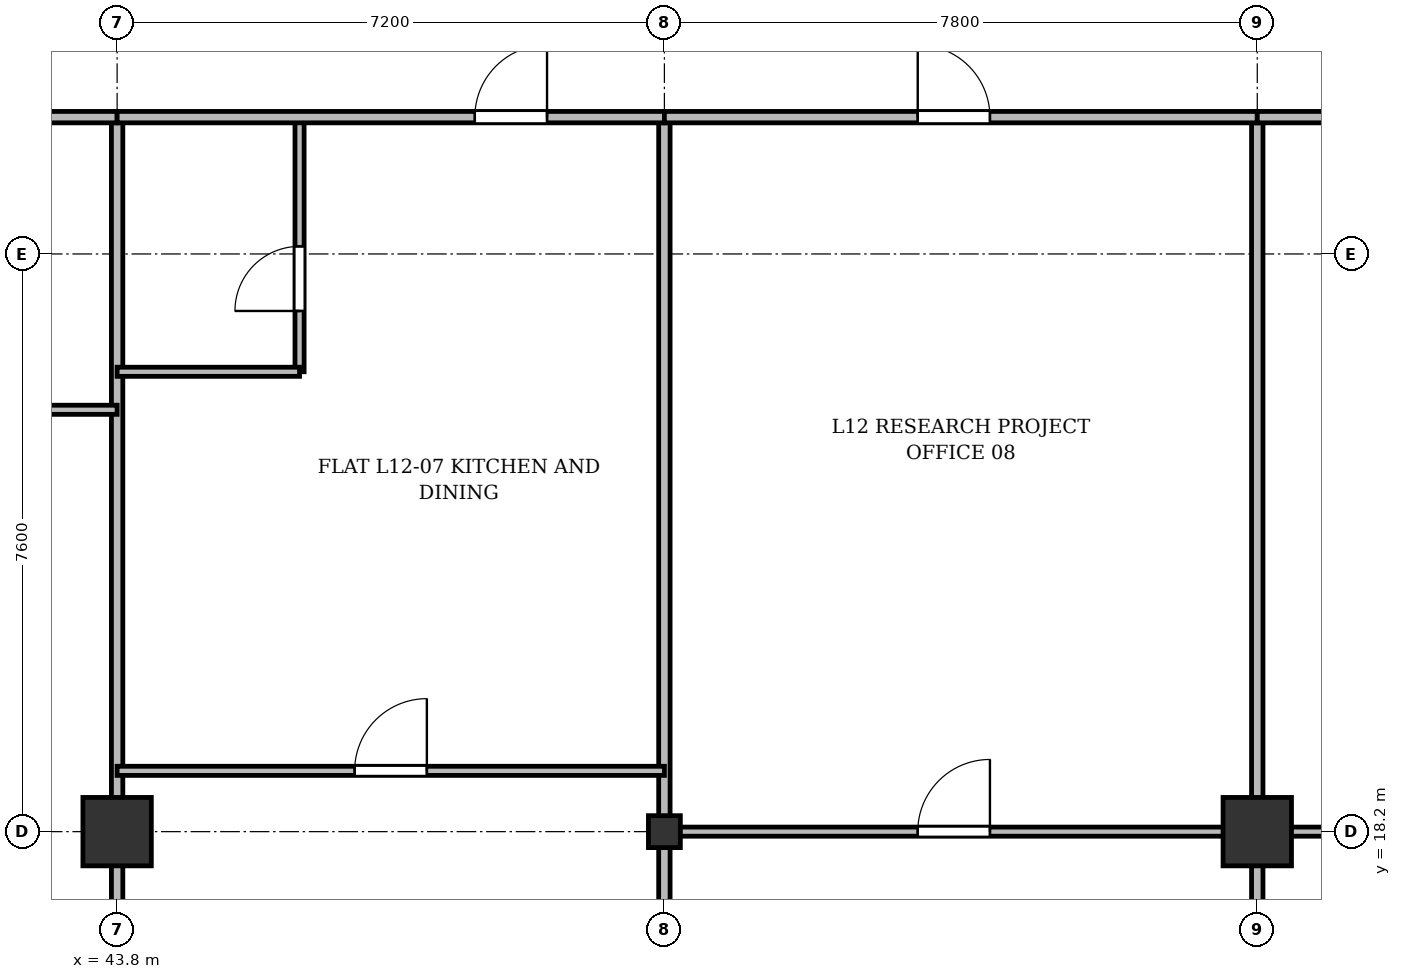
"""IFC4 building model, lengths in metres.
Left out: names, types, materials, properties, quantities, classifications, styles, units other than length and angle.
Written with IfcOpenShell. Run it as: python <this file> out.ifc"""

import sys

from ifc_helpers import new_model, si_unit, direction, frame, frame_2d, origin, origin_2d, place, context, subcontext, project, spatial, rectangle, i_section, extrude, source, transform, mapped, element, fill, save


model = new_model("IFC4")
c1 = context("Model", 3, precision=1e-05, world=origin(), true_north=direction((0.0, 1.0)))
c2 = subcontext(c1, "Body", "Model", "MODEL_VIEW")
j1 = project(units=[si_unit("LENGTHUNIT", "METRE"), si_unit("PLANEANGLEUNIT", "RADIAN")], contexts=[c1])
p1 = place(None, origin())
s1 = spatial("IfcSite", under=j1, at=p1, CompositionType="ELEMENT")
p2 = place(p1, origin())
s2 = spatial("IfcBuilding", under=s1, at=p2, CompositionType="ELEMENT")
p3 = place(p2, frame((0.0, 0.0, 48.7)))
s3 = spatial("IfcBuildingStorey", under=s2, at=p3, CompositionType="ELEMENT", Elevation=48.7)
m1 = source(origin(), c2, "Body", "SweptSolid", [
    extrude(rectangle(XDim=0.9, YDim=0.9, at=origin_2d()), origin(), (0.0, 0.0, 1.0), 3.6),
])
p4 = place(p3, frame((43.8, 18.2, 0.0), z_axis=(0.0, 0.0, 1.0), x_axis=(1.0, 0.0, 0.0)))
e1 = element("IfcColumn", 1, at=p4, inside=s3, PredefinedType="COLUMN", context=c2, shape_type="MappedRepresentation", body=[
    mapped(m1, transform((0.0, 0.0, 0.0), x_axis=(1.0, 0.0, 0.0), y_axis=(0.0, 1.0, 0.0), z_axis=(0.0, 0.0, 1.0), scale=1.0)),
])
m2 = source(origin(), c2, "Body", "SweptSolid", [
    extrude(i_section(OverallWidth=0.42, OverallDepth=0.42, WebThickness=0.026, FlangeThickness=0.04, at=origin_2d()), origin(), (0.0, 0.0, 1.0), 3.6),
])
p5 = place(p3, frame((51.0, 18.2, 0.0), z_axis=(0.0, 0.0, 1.0), x_axis=(1.0, 0.0, 0.0)))
e2 = element("IfcColumn", 2, at=p5, inside=s3, PredefinedType="COLUMN", context=c2, shape_type="MappedRepresentation", body=[
    mapped(m2, transform((0.0, 0.0, 0.0), x_axis=(1.0, 0.0, 0.0), y_axis=(0.0, 1.0, 0.0), z_axis=(0.0, 0.0, 1.0), scale=1.0)),
])
p6 = place(p3, frame((58.8, 18.2, 0.0), z_axis=(0.0, 0.0, 1.0), x_axis=(1.0, 0.0, 0.0)))
e3 = element("IfcColumn", 3, at=p6, inside=s3, PredefinedType="COLUMN", context=c2, shape_type="MappedRepresentation", body=[
    mapped(m1, transform((0.0, 0.0, 0.0), x_axis=(1.0, 0.0, 0.0), y_axis=(0.0, 1.0, 0.0), z_axis=(0.0, 0.0, 1.0), scale=1.0)),
])
for number, where, z_axis, x_axis in (
    (4, (43.8, 3.145, 0.0), (0.0, 0.0, 1.0), (0.0, 1.0, 0.0)),
    (5, (51.0, 3.145, 0.0), (0.0, 0.0, 1.0), (0.0, 1.0, 0.0)),
    (6, (58.8, 3.145, 0.0), (0.0, 0.0, 1.0), (0.0, 1.0, 0.0)),
):
    element("IfcWall", number, at=place(p3, frame(where, z_axis=z_axis, x_axis=x_axis)), inside=s3, PredefinedType="PARTITIONING", context=c2, shape_type="SweptSolid", body=[
        extrude(rectangle(XDim=24.455, YDim=0.15, at=frame_2d((12.228, 0.0))), origin(), (0.0, 0.0, 1.0), 2.752),
    ])
p7 = place(p3, frame((39.0, 27.6, 0.0), z_axis=(0.0, 0.0, 1.0), x_axis=(1.0, 0.0, 0.0)))
e7 = element("IfcWall", 7, at=p7, inside=s3, PredefinedType="PARTITIONING", context=c2, shape_type="SweptSolid", body=[
    extrude(rectangle(XDim=4.8, YDim=0.15, at=frame_2d((2.4, 0.0))), origin(), (0.0, 0.0, 1.0), 2.752),
])
p8 = place(p7, frame((1.834, 0.0, 0.0)))
e8 = element("IfcOpeningElement", 8, at=p8, cuts=e7, PredefinedType="OPENING", context=c2, shape_type="SweptSolid", body=[
    extrude(rectangle(XDim=0.95, YDim=2.15, at=frame_2d((0.475, 1.075))), frame((0.0, 0.085, 0.0), z_axis=(0.0, -1.0, 0.0), x_axis=(1.0, 0.0, 0.0)), (0.0, 0.0, 1.0), 0.17),
])
p9 = place(p3, frame((39.0, 23.75, 0.0), z_axis=(0.0, 0.0, 1.0), x_axis=(1.0, 0.0, 0.0)))
e9 = element("IfcWall", 9, at=p9, inside=s3, PredefinedType="PARTITIONING", context=c2, shape_type="SweptSolid", body=[
    extrude(rectangle(XDim=4.8, YDim=0.12, at=frame_2d((2.4, 0.0))), origin(), (0.0, 0.0, 1.0), 2.752),
])
p10 = place(p9, frame((1.834, 0.0, 0.0)))
e10 = element("IfcOpeningElement", 10, at=p10, cuts=e9, PredefinedType="OPENING", context=c2, shape_type="SweptSolid", body=[
    extrude(rectangle(XDim=0.95, YDim=2.15, at=frame_2d((0.475, 1.075))), frame((0.0, 0.07, 0.0), z_axis=(0.0, -1.0, 0.0), x_axis=(1.0, 0.0, 0.0)), (0.0, 0.0, 1.0), 0.14),
])
p11 = place(p3, frame((43.8, 19.0, 0.0), z_axis=(0.0, 0.0, 1.0), x_axis=(1.0, 0.0, 0.0)))
e11 = element("IfcWall", 11, at=p11, inside=s3, PredefinedType="PARTITIONING", context=c2, shape_type="SweptSolid", body=[
    extrude(rectangle(XDim=7.2, YDim=0.12, at=frame_2d((3.6, 0.0))), origin(), (0.0, 0.0, 1.0), 2.752),
])
p12 = place(p11, frame((3.125, 0.0, 0.0)))
e12 = element("IfcOpeningElement", 12, at=p12, cuts=e11, PredefinedType="OPENING", context=c2, shape_type="SweptSolid", body=[
    extrude(rectangle(XDim=0.95, YDim=2.15, at=frame_2d((0.475, 1.075))), frame((0.0, 0.07, 0.0), z_axis=(0.0, -1.0, 0.0), x_axis=(1.0, 0.0, 0.0)), (0.0, 0.0, 1.0), 0.14),
])
p13 = place(p3, frame((46.2, 24.25, 0.0), z_axis=(0.0, 0.0, 1.0), x_axis=(0.0, 1.0, 0.0)))
e13 = element("IfcWall", 13, at=p13, inside=s3, PredefinedType="PARTITIONING", context=c2, shape_type="SweptSolid", body=[
    extrude(rectangle(XDim=3.35, YDim=0.12, at=frame_2d((1.675, 0.0))), origin(), (0.0, 0.0, 1.0), 2.94),
])
p14 = place(p13, frame((0.8, 0.0, 0.0)))
e14 = element("IfcOpeningElement", 14, at=p14, cuts=e13, PredefinedType="OPENING", context=c2, shape_type="SweptSolid", body=[
    extrude(rectangle(XDim=0.85, YDim=2.1, at=frame_2d((0.425, 1.05))), frame((0.0, 0.07, 0.0), z_axis=(0.0, -1.0, 0.0), x_axis=(1.0, 0.0, 0.0)), (0.0, 0.0, 1.0), 0.14),
])
p15 = place(p3, frame((43.8, 24.25, 0.0), z_axis=(0.0, 0.0, 1.0), x_axis=(1.0, 0.0, 0.0)))
e15 = element("IfcWall", 15, at=p15, inside=s3, PredefinedType="PARTITIONING", context=c2, shape_type="SweptSolid", body=[
    extrude(rectangle(XDim=2.4, YDim=0.12, at=frame_2d((1.2, 0.0))), origin(), (0.0, 0.0, 1.0), 2.752),
])
p16 = place(p3, frame((43.8, 27.6, 0.0), z_axis=(0.0, 0.0, 1.0), x_axis=(1.0, 0.0, 0.0)))
e16 = element("IfcWall", 16, at=p16, inside=s3, PredefinedType="PARTITIONING", context=c2, shape_type="SweptSolid", body=[
    extrude(rectangle(XDim=7.2, YDim=0.15, at=frame_2d((3.6, 0.0))), origin(), (0.0, 0.0, 1.0), 2.752),
])
p17 = place(p16, frame((4.706, 0.0, 0.0)))
e17 = element("IfcOpeningElement", 17, at=p17, cuts=e16, PredefinedType="OPENING", context=c2, shape_type="SweptSolid", body=[
    extrude(rectangle(XDim=0.95, YDim=2.15, at=frame_2d((0.475, 1.075))), frame((0.0, 0.085, 0.0), z_axis=(0.0, -1.0, 0.0), x_axis=(1.0, 0.0, 0.0)), (0.0, 0.0, 1.0), 0.17),
])
p18 = place(p3, frame((51.0, 27.6, 0.0), z_axis=(0.0, 0.0, 1.0), x_axis=(1.0, 0.0, 0.0)))
e18 = element("IfcWall", 18, at=p18, inside=s3, PredefinedType="PARTITIONING", context=c2, shape_type="SweptSolid", body=[
    extrude(rectangle(XDim=7.8, YDim=0.15, at=frame_2d((3.9, 0.0))), origin(), (0.0, 0.0, 1.0), 2.752),
])
p19 = place(p18, frame((3.333, 0.0, 0.0)))
e19 = element("IfcOpeningElement", 19, at=p19, cuts=e18, PredefinedType="OPENING", context=c2, shape_type="SweptSolid", body=[
    extrude(rectangle(XDim=0.95, YDim=2.15, at=frame_2d((0.475, 1.075))), frame((0.0, 0.085, 0.0), z_axis=(0.0, -1.0, 0.0), x_axis=(1.0, 0.0, 0.0)), (0.0, 0.0, 1.0), 0.17),
])
p20 = place(p3, frame((51.0, 18.2, 0.0), z_axis=(0.0, 0.0, 1.0), x_axis=(1.0, 0.0, 0.0)))
e20 = element("IfcWall", 20, at=p20, inside=s3, PredefinedType="PARTITIONING", context=c2, shape_type="SweptSolid", body=[
    extrude(rectangle(XDim=7.8, YDim=0.12, at=frame_2d((3.9, 0.0))), origin(), (0.0, 0.0, 1.0), 2.69),
])
p21 = place(p20, frame((3.333, 0.0, 0.0)))
e21 = element("IfcOpeningElement", 21, at=p21, cuts=e20, PredefinedType="OPENING", context=c2, shape_type="SweptSolid", body=[
    extrude(rectangle(XDim=0.95, YDim=2.15, at=frame_2d((0.475, 1.075))), frame((0.0, 0.07, 0.0), z_axis=(0.0, -1.0, 0.0), x_axis=(1.0, 0.0, 0.0)), (0.0, 0.0, 1.0), 0.14),
])
p22 = place(p3, frame((58.8, 27.6, 0.0), z_axis=(0.0, 0.0, 1.0), x_axis=(1.0, 0.0, 0.0)))
e22 = element("IfcWall", 22, at=p22, inside=s3, PredefinedType="PARTITIONING", context=c2, shape_type="SweptSolid", body=[
    extrude(rectangle(XDim=5.2, YDim=0.15, at=frame_2d((2.6, 0.0))), origin(), (0.0, 0.0, 1.0), 2.752),
])
p23 = place(p22, frame((2.033, 0.0, 0.0)))
e23 = element("IfcOpeningElement", 23, at=p23, cuts=e22, PredefinedType="OPENING", context=c2, shape_type="SweptSolid", body=[
    extrude(rectangle(XDim=0.95, YDim=2.15, at=frame_2d((0.475, 1.075))), frame((0.0, 0.085, 0.0), z_axis=(0.0, -1.0, 0.0), x_axis=(1.0, 0.0, 0.0)), (0.0, 0.0, 1.0), 0.17),
])
p24 = place(p3, frame((58.8, 18.2, 0.0), z_axis=(0.0, 0.0, 1.0), x_axis=(1.0, 0.0, 0.0)))
e24 = element("IfcWall", 24, at=p24, inside=s3, PredefinedType="PARTITIONING", context=c2, shape_type="SweptSolid", body=[
    extrude(rectangle(XDim=5.2, YDim=0.12, at=frame_2d((2.6, 0.0))), origin(), (0.0, 0.0, 1.0), 2.69),
])
p25 = place(p24, frame((2.033, 0.0, 0.0)))
e25 = element("IfcOpeningElement", 25, at=p25, cuts=e24, PredefinedType="OPENING", context=c2, shape_type="SweptSolid", body=[
    extrude(rectangle(XDim=0.95, YDim=2.15, at=frame_2d((0.475, 1.075))), frame((0.0, 0.07, 0.0), z_axis=(0.0, -1.0, 0.0), x_axis=(1.0, 0.0, 0.0)), (0.0, 0.0, 1.0), 0.14),
])
m3 = source(origin(), c2, "Body", "SweptSolid", [
    extrude(rectangle(XDim=0.95, YDim=2.15, at=frame_2d((0.475, 1.075))), frame((0.0, 0.025, 0.0), z_axis=(0.0, -1.0, 0.0), x_axis=(1.0, 0.0, 0.0)), (0.0, 0.0, 1.0), 0.05),
])
p26 = place(p12, origin())
e26 = element("IfcDoor", 26, at=p26, inside=s3, OperationType="SINGLE_SWING_RIGHT", PredefinedType="DOOR", context=c2, shape_type="MappedRepresentation", body=[
    mapped(m3, transform((0.0, 0.0, 0.0), x_axis=(1.0, 0.0, 0.0), y_axis=(0.0, 1.0, 0.0), z_axis=(0.0, 0.0, 1.0), scale=1.0)),
])
fill(e12, e26)
m4 = source(origin(), c2, "Body", "SweptSolid", [
    extrude(rectangle(XDim=0.85, YDim=2.1, at=frame_2d((0.425, 1.05))), frame((0.0, 0.025, 0.0), z_axis=(0.0, -1.0, 0.0), x_axis=(1.0, 0.0, 0.0)), (0.0, 0.0, 1.0), 0.05),
])
p27 = place(p14, origin())
e27 = element("IfcDoor", 27, at=p27, inside=s3, OperationType="SINGLE_SWING_LEFT", PredefinedType="DOOR", context=c2, shape_type="MappedRepresentation", body=[
    mapped(m4, transform((0.0, 0.0, 0.0), x_axis=(1.0, 0.0, 0.0), y_axis=(0.0, 1.0, 0.0), z_axis=(0.0, 0.0, 1.0), scale=1.0)),
])
fill(e14, e27)
p28 = place(p17, origin())
e28 = element("IfcDoor", 28, at=p28, inside=s3, OperationType="SINGLE_SWING_RIGHT", PredefinedType="DOOR", context=c2, shape_type="MappedRepresentation", body=[
    mapped(m3, transform((0.0, 0.0, 0.0), x_axis=(1.0, 0.0, 0.0), y_axis=(0.0, 1.0, 0.0), z_axis=(0.0, 0.0, 1.0), scale=1.0)),
])
fill(e17, e28)
p29 = place(p19, origin())
e29 = element("IfcDoor", 29, at=p29, inside=s3, OperationType="SINGLE_SWING_LEFT", PredefinedType="DOOR", context=c2, shape_type="MappedRepresentation", body=[
    mapped(m3, transform((0.0, 0.0, 0.0), x_axis=(1.0, 0.0, 0.0), y_axis=(0.0, 1.0, 0.0), z_axis=(0.0, 0.0, 1.0), scale=1.0)),
])
fill(e19, e29)
p30 = place(p21, origin())
e30 = element("IfcDoor", 30, at=p30, inside=s3, OperationType="SINGLE_SWING_RIGHT", PredefinedType="DOOR", context=c2, shape_type="MappedRepresentation", body=[
    mapped(m3, transform((0.0, 0.0, 0.0), x_axis=(1.0, 0.0, 0.0), y_axis=(0.0, 1.0, 0.0), z_axis=(0.0, 0.0, 1.0), scale=1.0)),
])
fill(e21, e30)
save(model, sys.argv[1])
